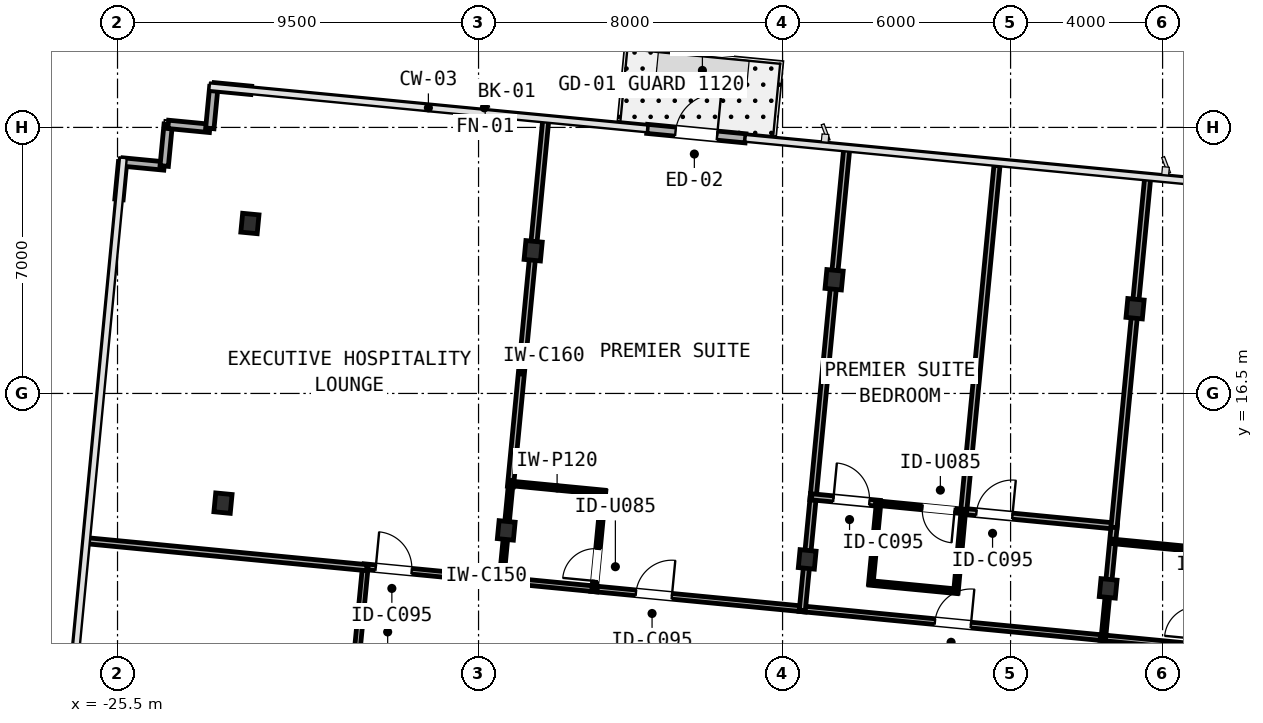
"""IFC4 building model, lengths in metres.
Left out: names, types, materials, properties, quantities, classifications, styles, units other than length and angle.
Written with IfcOpenShell. Run it as: python <this file> out.ifc"""

import sys

from ifc_helpers import new_model, si_unit, direction, frame, frame_2d, origin, origin_2d, place, context, subcontext, project, spatial, rectangle, i_section, extrude, element, fill, save


model = new_model("IFC4")
c1 = context("Model", 3, precision=1e-05, world=origin(), true_north=direction((0.0, 1.0)))
c2 = subcontext(c1, "Body", "Model", "MODEL_VIEW")
j1 = project(units=[si_unit("LENGTHUNIT", "METRE"), si_unit("PLANEANGLEUNIT", "RADIAN")], contexts=[c1])
p1 = place(None, origin())
s1 = spatial("IfcSite", under=j1, at=p1, CompositionType="ELEMENT")
p2 = place(p1, origin())
s2 = spatial("IfcBuilding", under=s1, at=p2, CompositionType="ELEMENT")
p3 = place(p2, frame((0.0, 0.0, 142.8)))
s3 = spatial("IfcBuildingStorey", under=s2, at=p3, CompositionType="ELEMENT", Elevation=142.8)
for number, where, z_axis, x_axis in (
    (1, (-22.725, 13.614, 0.0), (0.0, 0.0, 1.0), (0.995, -0.096, 0.0)),
    (2, (-22.016, 20.972, 0.0), (0.0, 0.0, 1.0), (0.995, -0.096, 0.0)),
):
    element("IfcColumn", number, at=place(p3, frame(where, z_axis=z_axis, x_axis=x_axis)), inside=s3, PredefinedType="COLUMN", context=c2, shape_type="SweptSolid", body=[
        extrude(i_section(OverallWidth=0.432, OverallDepth=0.498, WebThickness=0.056, FlangeThickness=0.089, FilletRadius=0.031, at=origin_2d()), origin(), (0.0, 0.0, 1.0), 3.45),
    ])
p4 = place(p3, frame((-15.271, 12.896, 0.0), z_axis=(0.0, 0.0, 1.0), x_axis=(0.995396198367, -0.09584575252, 0.0)))
e3 = element("IfcColumn", 3, at=p4, inside=s3, PredefinedType="COLUMN", context=c2, shape_type="SweptSolid", body=[
    extrude(i_section(OverallWidth=0.424, OverallDepth=0.474, WebThickness=0.048, FlangeThickness=0.077, FilletRadius=0.031, at=origin_2d()), origin(), (0.0, 0.0, 1.0), 3.45),
])
p5 = place(p3, frame((-14.563, 20.254, 0.0), z_axis=(0.0, 0.0, 1.0), x_axis=(0.995396198367, -0.09584575252, 0.0)))
e4 = element("IfcColumn", 4, at=p5, inside=s3, PredefinedType="COLUMN", context=c2, shape_type="SweptSolid", body=[
    extrude(i_section(OverallWidth=0.432, OverallDepth=0.498, WebThickness=0.056, FlangeThickness=0.089, FilletRadius=0.031, at=origin_2d()), origin(), (0.0, 0.0, 1.0), 3.45),
])
p6 = place(p3, frame((-7.352, 12.134, 0.0), z_axis=(0.0, 0.0, 1.0), x_axis=(0.995396198367, -0.09584575252, 0.0)))
e5 = element("IfcColumn", 5, at=p6, inside=s3, PredefinedType="COLUMN", context=c2, shape_type="SweptSolid", body=[
    extrude(i_section(OverallWidth=0.424, OverallDepth=0.474, WebThickness=0.048, FlangeThickness=0.077, FilletRadius=0.031, at=origin_2d()), origin(), (0.0, 0.0, 1.0), 3.45),
])
p7 = place(p3, frame((-6.643, 19.492, 0.0), z_axis=(0.0, 0.0, 1.0), x_axis=(0.995396198367, -0.09584575252, 0.0)))
e6 = element("IfcColumn", 6, at=p7, inside=s3, PredefinedType="COLUMN", context=c2, shape_type="SweptSolid", body=[
    extrude(i_section(OverallWidth=0.432, OverallDepth=0.498, WebThickness=0.056, FlangeThickness=0.089, FilletRadius=0.031, at=origin_2d()), origin(), (0.0, 0.0, 1.0), 3.45),
])
p8 = place(p3, frame((0.568, 11.371, 0.0), z_axis=(0.0, 0.0, 1.0), x_axis=(0.995396198367, -0.09584575252, 0.0)))
e7 = element("IfcColumn", 7, at=p8, inside=s3, PredefinedType="COLUMN", context=c2, shape_type="SweptSolid", body=[
    extrude(i_section(OverallWidth=0.424, OverallDepth=0.474, WebThickness=0.048, FlangeThickness=0.077, FilletRadius=0.031, at=origin_2d()), origin(), (0.0, 0.0, 1.0), 3.45),
])
p9 = place(p3, frame((1.276, 18.729, 0.0), z_axis=(0.0, 0.0, 1.0), x_axis=(0.995396198367, -0.09584575252, 0.0)))
e8 = element("IfcColumn", 8, at=p9, inside=s3, PredefinedType="COLUMN", context=c2, shape_type="SweptSolid", body=[
    extrude(i_section(OverallWidth=0.432, OverallDepth=0.498, WebThickness=0.056, FlangeThickness=0.089, FilletRadius=0.031, at=origin_2d()), origin(), (0.0, 0.0, 1.0), 3.45),
])
p10 = place(p3, frame((-11.563, 23.461, 0.0), z_axis=(0.0, 0.0, 1.0), x_axis=(0.995402144456, -0.095783979938, 0.0)))
e9 = element("IfcWall", 9, at=p10, inside=s3, PredefinedType="STANDARD", context=c2, shape_type="SweptSolid", body=[
    extrude(rectangle(XDim=2.6, YDim=0.24, at=frame_2d((1.3, 0.0))), origin(), (0.0, 0.0, 1.0), 3.19),
])
p11 = place(p10, frame((0.75, 0.0, 0.0)))
e10 = element("IfcOpeningElement", 10, at=p11, cuts=e9, PredefinedType="OPENING", context=c2, shape_type="SweptSolid", body=[
    extrude(rectangle(XDim=1.1, YDim=2.15, at=frame_2d((0.55, 1.075))), frame((0.0, 0.13, 0.0), z_axis=(0.0, -1.0, 0.0), x_axis=(1.0, 0.0, 0.0)), (0.0, 0.0, 1.0), 0.26),
])
p12 = place(p3, frame((-25.461, 21.605, 0.0), z_axis=(0.0, 0.0, 1.0), x_axis=(0.095937974524, 0.995387314086, 0.0)))
e11 = element("IfcWall", 11, at=p12, inside=s3, PredefinedType="STANDARD", context=c2, shape_type="SweptSolid", body=[
    extrude(rectangle(XDim=0.99, YDim=0.22, at=frame_2d((0.495, 0.0))), origin(), (0.0, 0.0, 1.0), 3.19),
])
for number, where, z_axis, x_axis in (
    (12, (-25.366, 22.59, 0.0), (0.0, 0.0, 1.0), (0.995, -0.096, 0.0)),
    (13, (-24.271, 22.485, 0.0), (0.0, 0.0, 1.0), (0.096, 0.995, 0.0)),
    (14, (-24.166, 23.58, 0.0), (0.0, 0.0, 1.0), (0.995, -0.096, 0.0)),
    (15, (-23.071, 23.475, 0.0), (0.0, 0.0, 1.0), (0.096, 0.995, 0.0)),
):
    element("IfcWall", number, at=place(p3, frame(where, z_axis=z_axis, x_axis=x_axis)), inside=s3, PredefinedType="STANDARD", context=c2, shape_type="SweptSolid", body=[
        extrude(rectangle(XDim=1.1, YDim=0.22, at=frame_2d((0.55, 0.0))), origin(), (0.0, 0.0, 1.0), 3.19),
    ])
p13 = place(p3, frame((-22.966, 24.57, 0.0), z_axis=(0.0, 0.0, 1.0), x_axis=(0.995387314086, -0.095937974524, 0.0)))
e16 = element("IfcWall", 16, at=p13, inside=s3, PredefinedType="STANDARD", context=c2, shape_type="SweptSolid", body=[
    extrude(rectangle(XDim=0.99, YDim=0.22, at=frame_2d((0.495, 0.0))), origin(), (0.0, 0.0, 1.0), 3.19),
])
p14 = place(p3, frame((-19.02, 11.943, 0.0), z_axis=(0.0, 0.0, 1.0), x_axis=(0.995397364202, -0.095833644092, 0.0)))
e17 = element("IfcWall", 17, at=p14, inside=s3, PredefinedType="PARTITIONING", context=c2, shape_type="SweptSolid", body=[
    extrude(rectangle(XDim=3.722, YDim=0.15, at=frame_2d((1.861, 0.0))), origin(), (0.0, 0.0, 1.0), 2.479),
])
p15 = place(p14, frame((0.315, 0.0, 0.0)))
e18 = element("IfcOpeningElement", 18, at=p15, cuts=e17, PredefinedType="OPENING", context=c2, shape_type="SweptSolid", body=[
    extrude(rectangle(XDim=0.95, YDim=2.15, at=frame_2d((0.475, 1.075))), frame((0.0, 0.085, 0.0), z_axis=(0.0, -1.0, 0.0), x_axis=(1.0, 0.0, 0.0)), (0.0, 0.0, 1.0), 0.17),
])
p16 = place(p3, frame((-13.04, 11.367, 0.0), z_axis=(0.0, 0.0, 1.0), x_axis=(0.995396240334, -0.095845316679, 0.0)))
e19 = element("IfcWall", 19, at=p16, inside=s3, PredefinedType="PARTITIONING", context=c2, shape_type="SweptSolid", body=[
    extrude(rectangle(XDim=5.67, YDim=0.15, at=frame_2d((2.835, 0.0))), origin(), (0.0, 0.0, 1.0), 2.479),
])
p17 = place(p16, frame((1.186, 0.0, 0.0)))
e20 = element("IfcOpeningElement", 20, at=p17, cuts=e19, PredefinedType="OPENING", context=c2, shape_type="SweptSolid", body=[
    extrude(rectangle(XDim=0.95, YDim=2.15, at=frame_2d((0.475, 1.075))), frame((0.0, 0.085, 0.0), z_axis=(0.0, -1.0, 0.0), x_axis=(1.0, 0.0, 0.0)), (0.0, 0.0, 1.0), 0.17),
])
p18 = place(p3, frame((-15.478, 11.602, 0.0), z_axis=(0.0, 0.0, 1.0), x_axis=(0.995398413865, -0.095822740911, 0.0)))
e21 = element("IfcWall", 21, at=p18, inside=s3, PredefinedType="PARTITIONING", context=c2, shape_type="SweptSolid", body=[
    extrude(rectangle(XDim=2.614, YDim=0.15, at=frame_2d((1.307, 0.0))), origin(), (0.0, 0.0, 1.0), 2.479),
])
p19 = place(p3, frame((-7.559, 10.84, 0.0), z_axis=(0.0, 0.0, 1.0), x_axis=(0.995395467524, -0.095853342309, 0.0)))
e22 = element("IfcWall", 22, at=p19, inside=s3, PredefinedType="PARTITIONING", context=c2, shape_type="SweptSolid", body=[
    extrude(rectangle(XDim=8.12, YDim=0.15, at=frame_2d((4.06, 0.0))), origin(), (0.0, 0.0, 1.0), 2.479),
])
p20 = place(p19, frame((3.585, 0.0, 0.0)))
e23 = element("IfcOpeningElement", 23, at=p20, cuts=e22, PredefinedType="OPENING", context=c2, shape_type="SweptSolid", body=[
    extrude(rectangle(XDim=0.95, YDim=2.15, at=frame_2d((0.475, 1.075))), frame((0.0, 0.085, 0.0), z_axis=(0.0, -1.0, 0.0), x_axis=(1.0, 0.0, 0.0)), (0.0, 0.0, 1.0), 0.17),
])
p21 = place(p3, frame((0.361, 10.077, 0.0), z_axis=(0.0, 0.0, 1.0), x_axis=(0.995397556197, -0.095831649869, 0.0)))
e24 = element("IfcWall", 24, at=p21, inside=s3, PredefinedType="PARTITIONING", context=c2, shape_type="SweptSolid", body=[
    extrude(rectangle(XDim=2.614, YDim=0.15, at=frame_2d((1.307, 0.0))), origin(), (0.0, 0.0, 1.0), 2.479),
])
p22 = place(p3, frame((-19.19, 9.759, 0.0), z_axis=(0.0, 0.0, 1.0), x_axis=(0.095882898123, 0.995392620953, 0.0)))
e25 = element("IfcWall", 25, at=p22, inside=s3, PredefinedType="PARTITIONING", context=c2, shape_type="SweptSolid", body=[
    extrude(rectangle(XDim=2.21, YDim=0.15, at=frame_2d((1.105, 0.0))), origin(), (0.0, 0.0, 1.0), 2.718),
])
p23 = place(p3, frame((-14.58, 20.079, 0.0), z_axis=(0.0, 0.0, 1.0), x_axis=(-0.095823018237, -0.995398387168, 0.0)))
e26 = element("IfcWall", 26, at=p23, inside=s3, PredefinedType="PARTITIONING", context=c2, shape_type="SweptSolid", body=[
    extrude(rectangle(XDim=6.056, YDim=0.16, at=frame_2d((3.028, 0.0))), origin(), (0.0, 0.0, 1.0), 2.479),
])
p24 = place(p3, frame((-14.225, 23.758, 0.0), z_axis=(0.0, 0.0, 1.0), x_axis=(-0.095859866796, -0.995394839216, 0.0)))
e27 = element("IfcWall", 27, at=p24, inside=s3, PredefinedType="PARTITIONING", context=c2, shape_type="SweptSolid", body=[
    extrude(rectangle(XDim=3.344, YDim=0.16, at=frame_2d((1.672, 0.0))), origin(), (0.0, 0.0, 1.0), 3.19),
])
p25 = place(p3, frame((-15.288, 12.721, 0.0), z_axis=(0.0, 0.0, 1.0), x_axis=(-0.095831494917, -0.995397571115, 0.0)))
e28 = element("IfcWall", 28, at=p25, inside=s3, PredefinedType="PARTITIONING", context=c2, shape_type="SweptSolid", body=[
    extrude(rectangle(XDim=1.172, YDim=0.12, at=frame_2d((0.586, 0.0))), origin(), (0.0, 0.0, 1.0), 2.479),
])
p26 = place(p3, frame((-15.144, 14.214, 0.0), z_axis=(0.0, 0.0, 1.0), x_axis=(-0.09590284245, -0.99539069958, 0.0)))
e29 = element("IfcWall", 29, at=p26, inside=s3, PredefinedType="PARTITIONING", context=c2, shape_type="SweptSolid", body=[
    extrude(rectangle(XDim=1.148, YDim=0.12, at=frame_2d((0.574, 0.0))), origin(), (0.0, 0.0, 1.0), 2.479),
])
p27 = place(p3, frame((-18.942, 11.916, 0.0), z_axis=(0.0, 0.0, 1.0), x_axis=(-0.995395927026, 0.095848570461, 0.0)))
e30 = element("IfcWall", 30, at=p27, inside=s3, PredefinedType="PARTITIONING", context=c2, shape_type="SweptSolid", body=[
    extrude(rectangle(XDim=7.448, YDim=0.16, at=frame_2d((3.724, 0.0))), origin(), (0.0, 0.0, 1.0), 2.557),
])
p28 = place(p3, frame((-12.962, 11.32, 0.0), z_axis=(0.0, 0.0, 1.0), x_axis=(0.095799078022, 0.995400691506, 0.0)))
e31 = element("IfcWall", 31, at=p28, inside=s3, PredefinedType="PARTITIONING", context=c2, shape_type="SweptSolid", body=[
    extrude(rectangle(XDim=2.63, YDim=0.12, at=frame_2d((1.315, 0.0))), origin(), (0.0, 0.0, 1.0), 2.479),
])
p29 = place(p28, frame((0.247, 0.0, 0.0)))
e32 = element("IfcOpeningElement", 32, at=p29, cuts=e31, PredefinedType="OPENING", context=c2, shape_type="SweptSolid", body=[
    extrude(rectangle(XDim=0.85, YDim=2.1, at=frame_2d((0.425, 1.05))), frame((0.0, 0.07, 0.0), z_axis=(0.0, -1.0, 0.0), x_axis=(1.0, 0.0, 0.0)), (0.0, 0.0, 1.0), 0.14),
])
p30 = place(p3, frame((-12.674, 13.894, 0.0), z_axis=(0.0, 0.0, 1.0), x_axis=(-0.995398237687, 0.095824571015, 0.0)))
e33 = element("IfcWall", 33, at=p30, inside=s3, PredefinedType="PARTITIONING", context=c2, shape_type="SweptSolid", body=[
    extrude(rectangle(XDim=2.53, YDim=0.12, at=frame_2d((1.265, 0.0))), origin(), (0.0, 0.0, 1.0), 2.479),
])
p31 = place(p3, frame((-7.369, 11.958, 0.0), z_axis=(0.0, 0.0, 1.0), x_axis=(-0.095831494917, -0.995397571115, 0.0)))
e34 = element("IfcWall", 34, at=p31, inside=s3, PredefinedType="PARTITIONING", context=c2, shape_type="SweptSolid", body=[
    extrude(rectangle(XDim=1.172, YDim=0.16, at=frame_2d((0.586, 0.0))), origin(), (0.0, 0.0, 1.0), 2.479),
])
p32 = place(p3, frame((-7.186, 13.858, 0.0), z_axis=(0.0, 0.0, 1.0), x_axis=(-0.095867871334, -0.99539406832, 0.0)))
e35 = element("IfcWall", 35, at=p32, inside=s3, PredefinedType="PARTITIONING", context=c2, shape_type="SweptSolid", body=[
    extrude(rectangle(XDim=1.556, YDim=0.16, at=frame_2d((0.778, 0.0))), origin(), (0.0, 0.0, 1.0), 2.479),
])
p33 = place(p3, frame((-6.66, 19.316, 0.0), z_axis=(0.0, 0.0, 1.0), x_axis=(-0.095877964448, -0.995393096185, 0.0)))
e36 = element("IfcWall", 36, at=p33, inside=s3, PredefinedType="PARTITIONING", context=c2, shape_type="SweptSolid", body=[
    extrude(rectangle(XDim=5.648, YDim=0.16, at=frame_2d((2.824, 0.0))), origin(), (0.0, 0.0, 1.0), 2.479),
])
p34 = place(p3, frame((-6.306, 22.995, 0.0), z_axis=(0.0, 0.0, 1.0), x_axis=(-0.095859866796, -0.995394839216, 0.0)))
e37 = element("IfcWall", 37, at=p34, inside=s3, PredefinedType="PARTITIONING", context=c2, shape_type="SweptSolid", body=[
    extrude(rectangle(XDim=3.344, YDim=0.16, at=frame_2d((1.672, 0.0))), origin(), (0.0, 0.0, 1.0), 3.19),
])
p35 = place(p3, frame((-7.233, 13.78, 0.0), z_axis=(0.0, 0.0, 1.0), x_axis=(0.995392932756, -0.095879661139, 0.0)))
e38 = element("IfcWall", 38, at=p35, inside=s3, PredefinedType="PARTITIONING", context=c2, shape_type="SweptSolid", body=[
    extrude(rectangle(XDim=1.808, YDim=0.16, at=frame_2d((0.904, 0.0))), origin(), (0.0, 0.0, 1.0), 2.479),
])
p36 = place(p35, frame((0.574, 0.0, 0.0)))
e39 = element("IfcOpeningElement", 39, at=p36, cuts=e38, PredefinedType="OPENING", context=c2, shape_type="SweptSolid", body=[
    extrude(rectangle(XDim=0.95, YDim=2.15, at=frame_2d((0.475, 1.075))), frame((0.0, 0.09, 0.0), z_axis=(0.0, -1.0, 0.0), x_axis=(1.0, 0.0, 0.0)), (0.0, 0.0, 1.0), 0.18),
])
p37 = place(p3, frame((-3.284, 13.4, 0.0), z_axis=(0.0, 0.0, 1.0), x_axis=(0.995395934192, -0.095848496045, 0.0)))
e40 = element("IfcWall", 40, at=p37, inside=s3, PredefinedType="PARTITIONING", context=c2, shape_type="SweptSolid", body=[
    extrude(rectangle(XDim=4.068, YDim=0.16, at=frame_2d((2.034, 0.0))), origin(), (0.0, 0.0, 1.0), 2.479),
])
p38 = place(p37, frame((0.386, 0.0, 0.0)))
e41 = element("IfcOpeningElement", 41, at=p38, cuts=e40, PredefinedType="OPENING", context=c2, shape_type="SweptSolid", body=[
    extrude(rectangle(XDim=0.95, YDim=2.15, at=frame_2d((0.475, 1.075))), frame((0.0, 0.09, 0.0), z_axis=(0.0, -1.0, 0.0), x_axis=(1.0, 0.0, 0.0)), (0.0, 0.0, 1.0), 0.18),
])
p39 = place(p3, frame((-5.47, 13.65, 0.0), z_axis=(0.0, 0.0, 1.0), x_axis=(-0.095846349626, -0.995396140872, 0.0)))
e42 = element("IfcWall", 42, at=p39, inside=s3, PredefinedType="PARTITIONING", context=c2, shape_type="SweptSolid", body=[
    extrude(rectangle(XDim=2.188, YDim=0.12, at=frame_2d((1.094, 0.0))), origin(), (0.0, 0.0, 1.0), 2.479),
])
p40 = place(p3, frame((-5.716, 11.516, 0.0), z_axis=(0.0, 0.0, 1.0), x_axis=(0.995393658532, -0.095872126059, 0.0)))
e43 = element("IfcWall", 43, at=p40, inside=s3, PredefinedType="PARTITIONING", context=c2, shape_type="SweptSolid", body=[
    extrude(rectangle(XDim=2.33, YDim=0.12, at=frame_2d((1.165, 0.0))), origin(), (0.0, 0.0, 1.0), 2.718),
])
p41 = place(p3, frame((-3.44, 11.257, 0.0), z_axis=(0.0, 0.0, 1.0), x_axis=(0.091159469261, 0.995836307414, 0.0)))
e44 = element("IfcWall", 44, at=p41, inside=s3, PredefinedType="PARTITIONING", context=c2, shape_type="SweptSolid", body=[
    extrude(rectangle(XDim=2.188, YDim=0.12, at=frame_2d((1.094, 0.0))), origin(), (0.0, 0.0, 1.0), 2.479),
])
p42 = place(p3, frame((0.729, 13.053, 0.0), z_axis=(0.0, 0.0, 1.0), x_axis=(-0.095783075571, -0.995402231479, 0.0)))
e45 = element("IfcWall", 45, at=p42, inside=s3, PredefinedType="PARTITIONING", context=c2, shape_type="SweptSolid", body=[
    extrude(rectangle(XDim=1.514, YDim=0.16, at=frame_2d((0.757, 0.0))), origin(), (0.0, 0.0, 1.0), 2.479),
])
p43 = place(p3, frame((0.551, 11.196, 0.0), z_axis=(0.0, 0.0, 1.0), x_axis=(-0.096017994315, -0.995379598328, 0.0)))
e46 = element("IfcWall", 46, at=p43, inside=s3, PredefinedType="PARTITIONING", context=c2, shape_type="SweptSolid", body=[
    extrude(rectangle(XDim=1.172, YDim=0.12, at=frame_2d((0.586, 0.0))), origin(), (0.0, 0.0, 1.0), 2.479),
])
p44 = place(p3, frame((-2.358, 22.495, 0.0), z_axis=(0.0, 0.0, 1.0), x_axis=(-0.095827921947, -0.995397915095, 0.0)))
e47 = element("IfcWall", 47, at=p44, inside=s3, PredefinedType="PARTITIONING", context=c2, shape_type="SweptSolid", body=[
    extrude(rectangle(XDim=9.182, YDim=0.16, at=frame_2d((4.591, 0.0))), origin(), (0.0, 0.0, 1.0), 2.557),
])
p45 = place(p3, frame((-3.194, 13.391, 0.0), z_axis=(0.0, 0.0, 1.0), x_axis=(-0.995388451302, 0.095926174813, 0.0)))
e48 = element("IfcWall", 48, at=p45, inside=s3, PredefinedType="PARTITIONING", context=c2, shape_type="SweptSolid", body=[
    extrude(rectangle(XDim=2.372, YDim=0.12, at=frame_2d((1.186, 0.0))), origin(), (0.0, 0.0, 1.0), 2.718),
])
p46 = place(p45, frame((0.28, 0.0, 0.0)))
e49 = element("IfcOpeningElement", 49, at=p46, cuts=e48, PredefinedType="OPENING", context=c2, shape_type="SweptSolid", body=[
    extrude(rectangle(XDim=0.85, YDim=2.1, at=frame_2d((0.425, 1.05))), frame((0.0, 0.07, 0.0), z_axis=(0.0, -1.0, 0.0), x_axis=(1.0, 0.0, 0.0)), (0.0, 0.0, 1.0), 0.14),
])
p47 = place(p3, frame((1.259, 18.554, 0.0), z_axis=(0.0, 0.0, 1.0), x_axis=(-0.095807834241, -0.995399848753, 0.0)))
e50 = element("IfcWall", 50, at=p47, inside=s3, PredefinedType="PARTITIONING", context=c2, shape_type="SweptSolid", body=[
    extrude(rectangle(XDim=5.606, YDim=0.16, at=frame_2d((2.803, 0.0))), origin(), (0.0, 0.0, 1.0), 2.479),
])
p48 = place(p3, frame((1.613, 22.233, 0.0), z_axis=(0.0, 0.0, 1.0), x_axis=(-0.095787528641, -0.99540180297, 0.0)))
e51 = element("IfcWall", 51, at=p48, inside=s3, PredefinedType="PARTITIONING", context=c2, shape_type="SweptSolid", body=[
    extrude(rectangle(XDim=3.344, YDim=0.16, at=frame_2d((1.672, 0.0))), origin(), (0.0, 0.0, 1.0), 3.19),
])
p49 = place(p3, frame((3.165, 12.369, 0.0), z_axis=(0.0, 0.0, 1.0), x_axis=(-0.995389028655, 0.095920183663, 0.0)))
e52 = element("IfcWall", 52, at=p49, inside=s3, PredefinedType="PARTITIONING", context=c2, shape_type="SweptSolid", body=[
    extrude(rectangle(XDim=2.53, YDim=0.12, at=frame_2d((1.265, 0.0))), origin(), (0.0, 0.0, 1.0), 2.479),
])
p50 = place(p11, origin())
e53 = element("IfcDoor", 53, at=p50, inside=s3, OperationType="SINGLE_SWING_RIGHT", PredefinedType="DOOR", context=c2, shape_type="SweptSolid", body=[
    extrude(rectangle(XDim=1.1, YDim=2.15, at=frame_2d((0.55, 1.075))), frame((0.0, 0.025, 0.0), z_axis=(0.0, -1.0, 0.0), x_axis=(1.0, 0.0, 0.0)), (0.0, 0.0, 1.0), 0.05),
])
fill(e10, e53)
p51 = place(p15, frame((0.95, 0.0, 0.0), z_axis=(0.0, 0.0, 1.0), x_axis=(-1.0, 0.0, 0.0)))
e54 = element("IfcDoor", 54, at=p51, inside=s3, OperationType="SINGLE_SWING_LEFT", PredefinedType="DOOR", context=c2, shape_type="SweptSolid", body=[
    extrude(rectangle(XDim=0.95, YDim=2.15, at=frame_2d((0.475, 1.075))), frame((0.0, 0.025, 0.0), z_axis=(0.0, -1.0, 0.0), x_axis=(1.0, 0.0, 0.0)), (0.0, 0.0, 1.0), 0.05),
])
fill(e18, e54)
p52 = place(p17, frame((0.95, 0.0, 0.0), z_axis=(0.0, 0.0, 1.0), x_axis=(-1.0, 0.0, 0.0)))
e55 = element("IfcDoor", 55, at=p52, inside=s3, OperationType="SINGLE_SWING_RIGHT", PredefinedType="DOOR", context=c2, shape_type="SweptSolid", body=[
    extrude(rectangle(XDim=0.95, YDim=2.15, at=frame_2d((0.475, 1.075))), frame((0.0, 0.025, 0.0), z_axis=(0.0, -1.0, 0.0), x_axis=(1.0, 0.0, 0.0)), (0.0, 0.0, 1.0), 0.05),
])
fill(e20, e55)
p53 = place(p29, frame((0.85, 0.0, 0.0), z_axis=(0.0, 0.0, 1.0), x_axis=(-1.0, 0.0, 0.0)))
e56 = element("IfcDoor", 56, at=p53, inside=s3, OperationType="SINGLE_SWING_LEFT", PredefinedType="DOOR", context=c2, shape_type="SweptSolid", body=[
    extrude(rectangle(XDim=0.85, YDim=2.1, at=frame_2d((0.425, 1.05))), frame((0.0, 0.025, 0.0), z_axis=(0.0, -1.0, 0.0), x_axis=(1.0, 0.0, 0.0)), (0.0, 0.0, 1.0), 0.05),
])
fill(e32, e56)
p54 = place(p20, frame((0.95, 0.0, 0.0), z_axis=(0.0, 0.0, 1.0), x_axis=(-1.0, 0.0, 0.0)))
e57 = element("IfcDoor", 57, at=p54, inside=s3, OperationType="SINGLE_SWING_RIGHT", PredefinedType="DOOR", context=c2, shape_type="SweptSolid", body=[
    extrude(rectangle(XDim=0.95, YDim=2.15, at=frame_2d((0.475, 1.075))), frame((0.0, 0.025, 0.0), z_axis=(0.0, -1.0, 0.0), x_axis=(1.0, 0.0, 0.0)), (0.0, 0.0, 1.0), 0.05),
])
fill(e23, e57)
p55 = place(p36, origin())
e58 = element("IfcDoor", 58, at=p55, inside=s3, OperationType="SINGLE_SWING_LEFT", PredefinedType="DOOR", context=c2, shape_type="SweptSolid", body=[
    extrude(rectangle(XDim=0.95, YDim=2.15, at=frame_2d((0.475, 1.075))), frame((0.0, 0.025, 0.0), z_axis=(0.0, -1.0, 0.0), x_axis=(1.0, 0.0, 0.0)), (0.0, 0.0, 1.0), 0.05),
])
fill(e39, e58)
p56 = place(p38, origin())
e59 = element("IfcDoor", 59, at=p56, inside=s3, OperationType="SINGLE_SWING_RIGHT", PredefinedType="DOOR", context=c2, shape_type="SweptSolid", body=[
    extrude(rectangle(XDim=0.95, YDim=2.15, at=frame_2d((0.475, 1.075))), frame((0.0, 0.025, 0.0), z_axis=(0.0, -1.0, 0.0), x_axis=(1.0, 0.0, 0.0)), (0.0, 0.0, 1.0), 0.05),
])
fill(e41, e59)
p57 = place(p46, frame((0.85, 0.0, 0.0), z_axis=(0.0, 0.0, 1.0), x_axis=(-1.0, 0.0, 0.0)))
e60 = element("IfcDoor", 60, at=p57, inside=s3, OperationType="SINGLE_SWING_LEFT", PredefinedType="DOOR", context=c2, shape_type="SweptSolid", body=[
    extrude(rectangle(XDim=0.85, YDim=2.1, at=frame_2d((0.425, 1.05))), frame((0.0, 0.025, 0.0), z_axis=(0.0, -1.0, 0.0), x_axis=(1.0, 0.0, 0.0)), (0.0, 0.0, 1.0), 0.05),
])
fill(e49, e60)
save(model, sys.argv[1])
